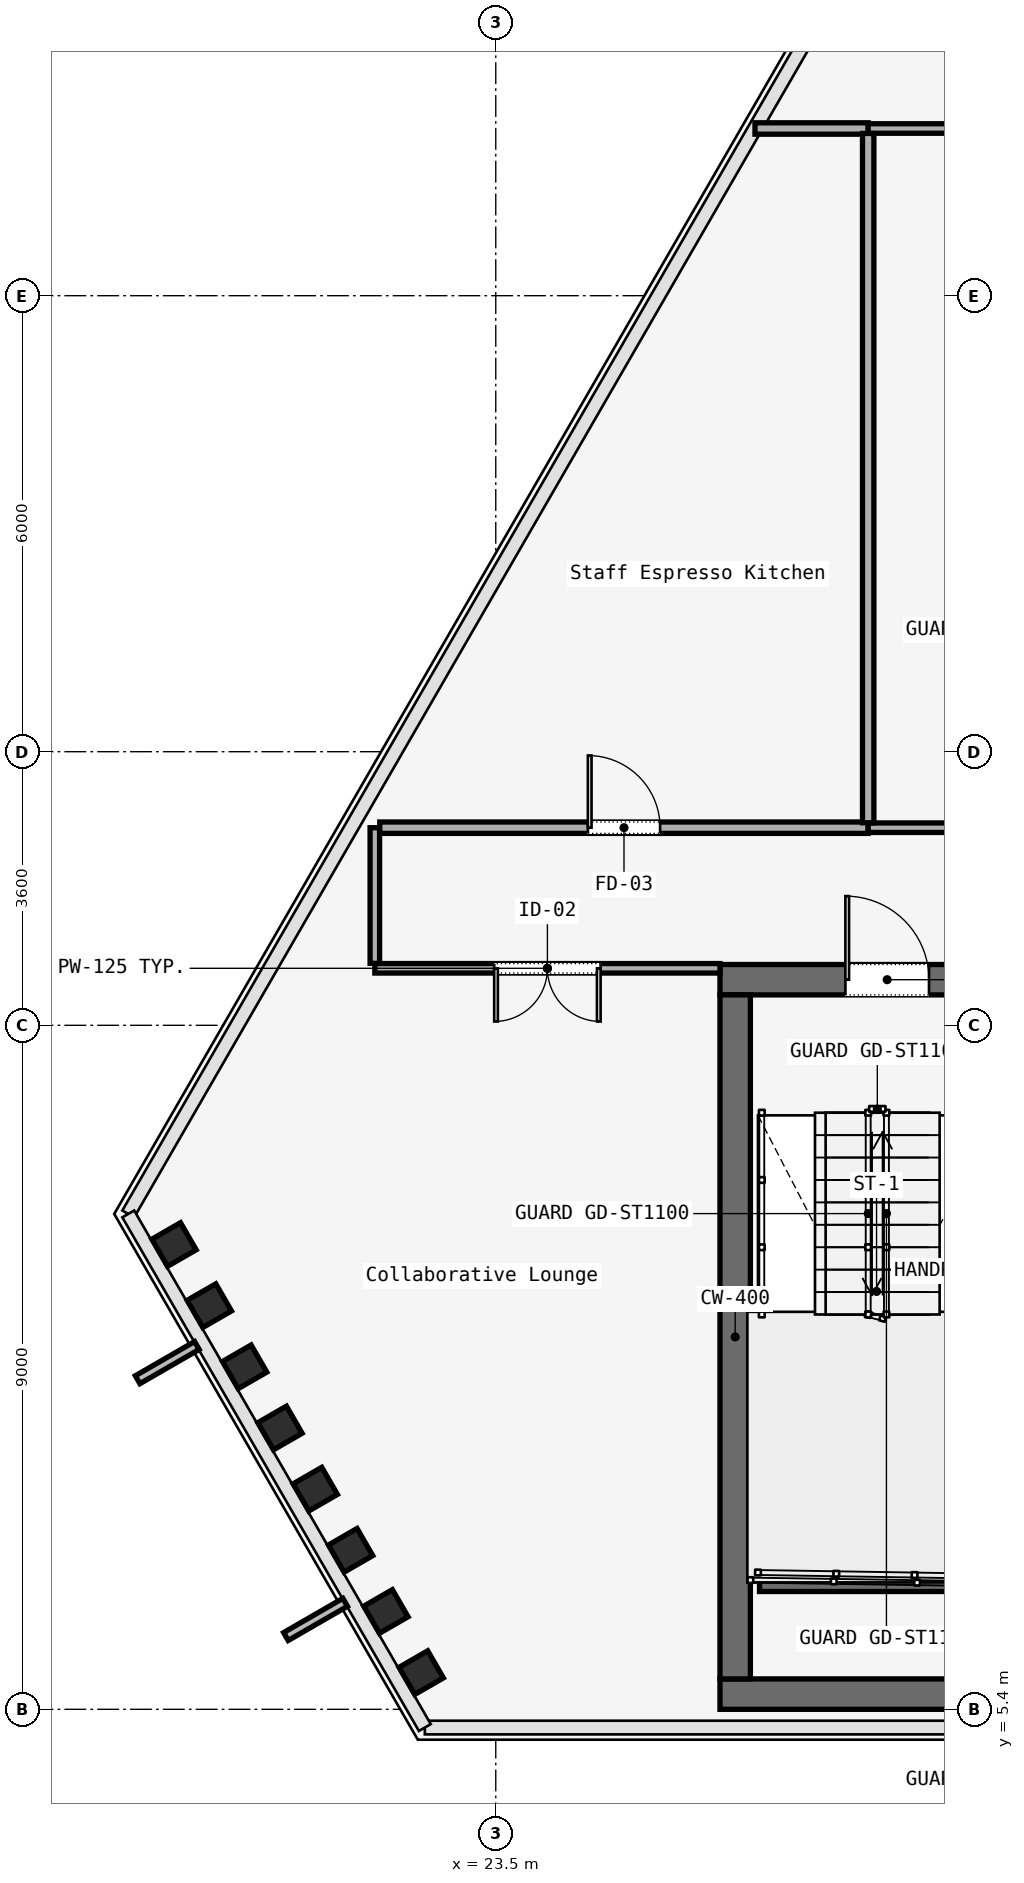
"""IFC4 building model, lengths in metres.
Left out: names, types, materials, properties, quantities, classifications, styles, units other than length and angle.
Written with IfcOpenShell. Run it as: python <this file> out.ifc"""

import sys

from ifc_helpers import new_model, si_unit, direction, frame, frame_2d, origin, origin_2d, place, context, subcontext, project, spatial, rectangle, i_section, extrude, element, fill, save


model = new_model("IFC4")
c1 = context("Model", 3, precision=1e-05, world=origin(), true_north=direction((0.0, 1.0)))
c2 = subcontext(c1, "Body", "Model", "MODEL_VIEW")
j1 = project(units=[si_unit("LENGTHUNIT", "METRE"), si_unit("PLANEANGLEUNIT", "RADIAN")], contexts=[c1])
p1 = place(None, origin())
s1 = spatial("IfcSite", under=j1, at=p1, CompositionType="ELEMENT")
p2 = place(p1, origin())
s2 = spatial("IfcBuilding", under=s1, at=p2, CompositionType="ELEMENT")
p3 = place(p2, frame((0.0, 0.0, 225.6)))
s3 = spatial("IfcBuildingStorey", under=s2, at=p3, CompositionType="ELEMENT", Elevation=225.6)
p4 = place(p3, frame((26.45, 15.0, 0.0), z_axis=(0.0, 0.0, 1.0), x_axis=(1.0, 0.0, 0.0)))
e1 = element("IfcWall", 1, at=p4, inside=s3, PredefinedType="SOLIDWALL", context=c2, shape_type="SweptSolid", body=[
    extrude(rectangle(XDim=31.1, YDim=0.4, at=frame_2d((15.55, 0.0))), origin(), (0.0, 0.0, 1.0), 3.58),
])
p5 = place(p4, frame((1.65, 0.0, 0.0)))
e2 = element("IfcOpeningElement", 2, at=p5, cuts=e1, PredefinedType="OPENING", context=c2, shape_type="SweptSolid", body=[
    extrude(rectangle(XDim=1.1, YDim=2.2, at=frame_2d((0.55, 1.1))), frame((0.0, 0.2, 0.0), z_axis=(0.0, -1.0, 0.0), x_axis=(1.0, 0.0, 0.0)), (0.0, 0.0, 1.0), 0.4),
])
p6 = place(p4, frame((13.65, 0.0, 0.0)))
e3 = element("IfcOpeningElement", 3, at=p6, cuts=e1, PredefinedType="OPENING", context=c2, shape_type="SweptSolid", body=[
    extrude(rectangle(XDim=1.1, YDim=2.2, at=frame_2d((0.55, 1.1))), frame((0.0, 0.2, 0.0), z_axis=(0.0, -1.0, 0.0), x_axis=(1.0, 0.0, 0.0)), (0.0, 0.0, 1.0), 0.4),
])
p7 = place(p4, frame((25.55, 0.0, 0.0)))
e4 = element("IfcOpeningElement", 4, at=p7, cuts=e1, PredefinedType="OPENING", context=c2, shape_type="SweptSolid", body=[
    extrude(rectangle(XDim=1.1, YDim=2.2, at=frame_2d((0.55, 1.1))), frame((0.0, 0.2, 0.0), z_axis=(0.0, -1.0, 0.0), x_axis=(1.0, 0.0, 0.0)), (0.0, 0.0, 1.0), 0.4),
])
p8 = place(p4, frame((19.35, 0.0, 0.0)))
e5 = element("IfcOpeningElement", 5, at=p8, cuts=e1, PredefinedType="OPENING", context=c2, shape_type="SweptSolid", body=[
    extrude(rectangle(XDim=1.1, YDim=2.2, at=frame_2d((0.55, 1.1))), frame((0.0, 0.2, 0.0), z_axis=(0.0, -1.0, 0.0), x_axis=(1.0, 0.0, 0.0)), (0.0, 0.0, 1.0), 0.4),
])
p9 = place(p4, frame((21.4, 0.0, 0.0)))
e6 = element("IfcOpeningElement", 6, at=p9, cuts=e1, PredefinedType="OPENING", context=c2, shape_type="SweptSolid", body=[
    extrude(rectangle(XDim=0.9, YDim=2.1, at=frame_2d((0.45, 1.05))), frame((0.0, 0.2, 0.0), z_axis=(0.0, -1.0, 0.0), x_axis=(1.0, 0.0, 0.0)), (0.0, 0.0, 1.0), 0.4),
])
p10 = place(p4, frame((6.04, 0.0, 0.0)))
e7 = element("IfcOpeningElement", 7, at=p10, cuts=e1, PredefinedType="OPENING", context=c2, shape_type="SweptSolid", body=[
    extrude(rectangle(XDim=0.95, YDim=2.2, at=frame_2d((0.475, 1.1))), frame((0.0, 0.2, 0.0), z_axis=(0.0, -1.0, 0.0), x_axis=(1.0, 0.0, 0.0)), (0.0, 0.0, 1.0), 0.4),
])
p11 = place(p4, frame((9.99, 0.0, 0.0)))
e8 = element("IfcOpeningElement", 8, at=p11, cuts=e1, PredefinedType="OPENING", context=c2, shape_type="SweptSolid", body=[
    extrude(rectangle(XDim=0.95, YDim=2.2, at=frame_2d((0.475, 1.1))), frame((0.0, 0.2, 0.0), z_axis=(0.0, -1.0, 0.0), x_axis=(1.0, 0.0, 0.0)), (0.0, 0.0, 1.0), 0.4),
])
p12 = place(p4, frame((23.35, 0.0, 0.0)))
e9 = element("IfcOpeningElement", 9, at=p12, cuts=e1, PredefinedType="OPENING", context=c2, shape_type="SweptSolid", body=[
    extrude(rectangle(XDim=1.3, YDim=2.3, at=frame_2d((0.65, 1.15))), frame((0.0, 0.2, 0.0), z_axis=(0.0, -1.0, 0.0), x_axis=(1.0, 0.0, 0.0)), (0.0, 0.0, 1.0), 0.4),
])
p13 = place(p3, frame((26.45, 5.6, 0.0), z_axis=(0.0, 0.0, 1.0), x_axis=(1.0, 0.0, 0.0)))
e10 = element("IfcWall", 10, at=p13, inside=s3, PredefinedType="SOLIDWALL", context=c2, shape_type="SweptSolid", body=[
    extrude(rectangle(XDim=31.1, YDim=0.4, at=frame_2d((15.55, 0.0))), origin(), (0.0, 0.0, 1.0), 3.58),
])
p14 = place(p3, frame((26.65, 5.8, 0.0), z_axis=(0.0, 0.0, 1.0), x_axis=(0.0, 1.0, 0.0)))
e11 = element("IfcWall", 11, at=p14, inside=s3, PredefinedType="SOLIDWALL", context=c2, shape_type="SweptSolid", body=[
    extrude(rectangle(XDim=9.0, YDim=0.4, at=frame_2d((4.5, 0.0))), origin(), (0.0, 0.0, 1.0), 3.58),
])
p15 = place(p3, frame((19.267, 11.516, 0.0), z_axis=(0.040911322599, -0.135695970997, 0.989905483942), x_axis=(-0.726178262725, 0.676461219214, 0.122740986008)))
e12 = element("IfcColumn", 12, at=p15, inside=s3, PredefinedType="COLUMN", context=c2, shape_type="SweptSolid", body=[
    extrude(i_section(OverallWidth=0.412, OverallDepth=0.435, WebThickness=0.036, FlangeThickness=0.044, FilletRadius=0.015, at=origin_2d()), origin(), (0.0, 0.0, 1.0), 3.616),
])
p16 = place(p3, frame((19.731, 10.711, 0.0), z_axis=(0.030596538724, -0.117850827252, 0.99255983917), x_axis=(-0.699960394522, 0.706354529858, 0.105445361441)))
e13 = element("IfcColumn", 13, at=p16, inside=s3, PredefinedType="COLUMN", context=c2, shape_type="SweptSolid", body=[
    extrude(i_section(OverallWidth=0.412, OverallDepth=0.435, WebThickness=0.036, FlangeThickness=0.044, FilletRadius=0.015, at=origin_2d()), origin(), (0.0, 0.0, 1.0), 3.607),
])
p17 = place(p3, frame((20.196, 9.906, 0.0), z_axis=(0.020081583921, -0.100000860471, 0.99478467916), x_axis=(-0.659830353691, 0.746204611865, 0.088332222777)))
e14 = element("IfcColumn", 14, at=p17, inside=s3, PredefinedType="COLUMN", context=c2, shape_type="SweptSolid", body=[
    extrude(i_section(OverallWidth=0.412, OverallDepth=0.435, WebThickness=0.036, FlangeThickness=0.044, FilletRadius=0.015, at=origin_2d()), origin(), (0.0, 0.0, 1.0), 3.599),
])
p18 = place(p3, frame((20.661, 9.102, 0.0), z_axis=(0.009651199464, -0.081967229252, 0.99658829397), x_axis=(-0.597494419555, 0.798681156256, 0.071476074611)))
e15 = element("IfcColumn", 15, at=p18, inside=s3, PredefinedType="COLUMN", context=c2, shape_type="SweptSolid", body=[
    extrude(i_section(OverallWidth=0.412, OverallDepth=0.435, WebThickness=0.036, FlangeThickness=0.044, FilletRadius=0.015, at=origin_2d()), origin(), (0.0, 0.0, 1.0), 3.592),
])
p19 = place(p3, frame((21.125, 8.297, 0.0), z_axis=(-0.000884780272, -0.063772239608, 0.997964086838), x_axis=(-0.487962206746, 0.871115448004, 0.055233694748)))
e16 = element("IfcColumn", 16, at=p19, inside=s3, PredefinedType="COLUMN", context=c2, shape_type="SweptSolid", body=[
    extrude(i_section(OverallWidth=0.412, OverallDepth=0.435, WebThickness=0.036, FlangeThickness=0.044, FilletRadius=0.015, at=origin_2d()), origin(), (0.0, 0.0, 1.0), 3.587),
])
p20 = place(p3, frame((21.59, 7.492, 0.0), z_axis=(-0.011444718102, -0.045642625765, 0.998892271039), x_axis=(-0.274587327315, 0.96069824947, 0.040751357577)))
e17 = element("IfcColumn", 17, at=p20, inside=s3, PredefinedType="COLUMN", context=c2, shape_type="SweptSolid", body=[
    extrude(i_section(OverallWidth=0.412, OverallDepth=0.435, WebThickness=0.036, FlangeThickness=0.044, FilletRadius=0.015, at=origin_2d()), origin(), (0.0, 0.0, 1.0), 3.584),
])
p21 = place(p3, frame((22.054, 6.687, 0.0), z_axis=(-0.022014623846, -0.02739900553, 0.999382134538), x_axis=(0.152327641316, 0.987861213843, 0.030438657581)))
e18 = element("IfcColumn", 18, at=p21, inside=s3, PredefinedType="COLUMN", context=c2, shape_type="SweptSolid", body=[
    extrude(i_section(OverallWidth=0.412, OverallDepth=0.435, WebThickness=0.036, FlangeThickness=0.044, FilletRadius=0.015, at=origin_2d()), origin(), (0.0, 0.0, 1.0), 3.582),
])
p22 = place(p3, frame((22.519, 5.882, 0.0), z_axis=(-0.032512304467, -0.009133435637, 0.999429602529), x_axis=(0.69804908245, 0.715452392755, 0.029246404757)))
e19 = element("IfcColumn", 19, at=p22, inside=s3, PredefinedType="COLUMN", context=c2, shape_type="SweptSolid", body=[
    extrude(i_section(OverallWidth=0.412, OverallDepth=0.435, WebThickness=0.036, FlangeThickness=0.044, FilletRadius=0.015, at=origin_2d()), origin(), (0.0, 0.0, 1.0), 3.582),
])
p23 = place(p3, frame((26.97, 7.05, 0.0), z_axis=(0.0, 0.0, 1.0), x_axis=(1.0, 0.0, 0.0)))
e20 = element("IfcWall", 20, at=p23, inside=s3, PredefinedType="SOLIDWALL", context=c2, shape_type="SweptSolid", body=[
    extrude(rectangle(XDim=3.115, YDim=0.2, at=frame_2d((1.558, 0.0))), origin(), (0.0, 0.0, 1.0), 3.8),
])
p24 = place(p3, frame((26.45, 15.15, 0.0), z_axis=(0.0, 0.0, 1.0), x_axis=(-1.0, 0.0, 0.0)))
e21 = element("IfcWall", 21, at=p24, inside=s3, PredefinedType="PARTITIONING", context=c2, shape_type="SweptSolid", body=[
    extrude(rectangle(XDim=4.541, YDim=0.125, at=frame_2d((2.271, 0.0))), origin(), (0.0, 0.0, 1.0), 3.01),
])
p25 = place(p24, frame((1.571, 0.0, 0.0)))
e22 = element("IfcOpeningElement", 22, at=p25, cuts=e21, PredefinedType="OPENING", context=c2, shape_type="SweptSolid", body=[
    extrude(rectangle(XDim=1.4, YDim=2.2, at=frame_2d((0.7, 1.1))), frame((0.0, 0.062, 0.0), z_axis=(0.0, -1.0, 0.0), x_axis=(1.0, 0.0, 0.0)), (0.0, 0.0, 1.0), 0.125),
])
p26 = place(p3, frame((21.909, 15.215, 0.0), z_axis=(0.0, 0.0, 1.0), x_axis=(0.0, 1.0, 0.0)))
e23 = element("IfcWall", 23, at=p26, inside=s3, PredefinedType="PARTITIONING", context=c2, shape_type="SweptSolid", body=[
    extrude(rectangle(XDim=1.785, YDim=0.125, at=frame_2d((0.893, 0.0))), origin(), (0.0, 0.0, 1.0), 3.01),
])
p27 = place(p3, frame((21.974, 17.0, 0.0), z_axis=(0.0, 0.0, 1.0), x_axis=(1.0, 0.0, 0.0)))
e24 = element("IfcWall", 24, at=p27, inside=s3, PredefinedType="PARTITIONING", context=c2, shape_type="SweptSolid", body=[
    extrude(rectangle(XDim=6.426, YDim=0.15, at=frame_2d((3.213, 0.0))), origin(), (0.0, 0.0, 1.0), 3.01),
])
p28 = place(p27, frame((2.738, 0.0, 0.0)))
e25 = element("IfcOpeningElement", 25, at=p28, cuts=e24, PredefinedType="OPENING", context=c2, shape_type="SweptSolid", body=[
    extrude(rectangle(XDim=0.95, YDim=2.2, at=frame_2d((0.475, 1.1))), frame((0.0, 0.075, 0.0), z_axis=(0.0, -1.0, 0.0), x_axis=(1.0, 0.0, 0.0)), (0.0, 0.0, 1.0), 0.15),
])
p29 = place(p3, frame((28.4, 17.0, 0.0), z_axis=(0.0, 0.0, 1.0), x_axis=(1.0, 0.0, 0.0)))
e26 = element("IfcWall", 26, at=p29, inside=s3, PredefinedType="PARTITIONING", context=c2, shape_type="SweptSolid", body=[
    extrude(rectangle(XDim=5.2, YDim=0.125, at=frame_2d((2.6, 0.0))), origin(), (0.0, 0.0, 1.0), 3.01),
])
p30 = place(p29, frame((2.125, 0.0, 0.0)))
e27 = element("IfcOpeningElement", 27, at=p30, cuts=e26, PredefinedType="OPENING", context=c2, shape_type="SweptSolid", body=[
    extrude(rectangle(XDim=0.95, YDim=2.2, at=frame_2d((0.475, 1.1))), frame((0.0, 0.062, 0.0), z_axis=(0.0, -1.0, 0.0), x_axis=(1.0, 0.0, 0.0)), (0.0, 0.0, 1.0), 0.125),
])
p31 = place(p3, frame((26.91, 26.2, 0.0), z_axis=(0.0, 0.0, 1.0), x_axis=(1.0, 0.0, 0.0)))
e28 = element("IfcWall", 28, at=p31, inside=s3, PredefinedType="PARTITIONING", context=c2, shape_type="SweptSolid", body=[
    extrude(rectangle(XDim=1.49, YDim=0.15, at=frame_2d((0.745, 0.0))), origin(), (0.0, 0.0, 1.0), 3.01),
])
p32 = place(p3, frame((28.4, 26.135, 0.0), z_axis=(0.0, 0.0, 1.0), x_axis=(0.0, -1.0, 0.0)))
e29 = element("IfcWall", 29, at=p32, inside=s3, PredefinedType="PARTITIONING", context=c2, shape_type="SweptSolid", body=[
    extrude(rectangle(XDim=9.07, YDim=0.15, at=frame_2d((4.535, 0.0))), origin(), (0.0, 0.0, 1.0), 3.01),
])
p33 = place(p3, frame((28.4, 26.2, 0.0), z_axis=(0.0, 0.0, 1.0), x_axis=(1.0, 0.0, 0.0)))
e30 = element("IfcWall", 30, at=p33, inside=s3, PredefinedType="PARTITIONING", context=c2, shape_type="SweptSolid", body=[
    extrude(rectangle(XDim=5.135, YDim=0.125, at=frame_2d((2.567, 0.0))), origin(), (0.0, 0.0, 1.0), 3.01),
])
p34 = place(p5, origin())
e31 = element("IfcDoor", 31, at=p34, inside=s3, OperationType="SINGLE_SWING_LEFT", PredefinedType="DOOR", context=c2, shape_type="SweptSolid", body=[
    extrude(rectangle(XDim=1.1, YDim=2.2, at=frame_2d((0.55, 1.1))), frame((0.0, 0.025, 0.0), z_axis=(0.0, -1.0, 0.0), x_axis=(1.0, 0.0, 0.0)), (0.0, 0.0, 1.0), 0.05),
])
fill(e2, e31)
p35 = place(p25, origin())
e32 = element("IfcDoor", 32, at=p35, inside=s3, OperationType="SINGLE_SWING_LEFT", PredefinedType="DOOR", context=c2, shape_type="SweptSolid", body=[
    extrude(rectangle(XDim=1.4, YDim=2.2, at=frame_2d((0.7, 1.1))), frame((0.0, 0.025, 0.0), z_axis=(0.0, -1.0, 0.0), x_axis=(1.0, 0.0, 0.0)), (0.0, 0.0, 1.0), 0.05),
])
fill(e22, e32)
p36 = place(p28, origin())
e33 = element("IfcDoor", 33, at=p36, inside=s3, OperationType="SINGLE_SWING_RIGHT", PredefinedType="DOOR", context=c2, shape_type="SweptSolid", body=[
    extrude(rectangle(XDim=0.95, YDim=2.2, at=frame_2d((0.475, 1.1))), frame((0.0, 0.025, 0.0), z_axis=(0.0, -1.0, 0.0), x_axis=(1.0, 0.0, 0.0)), (0.0, 0.0, 1.0), 0.05),
])
fill(e25, e33)
save(model, sys.argv[1])
